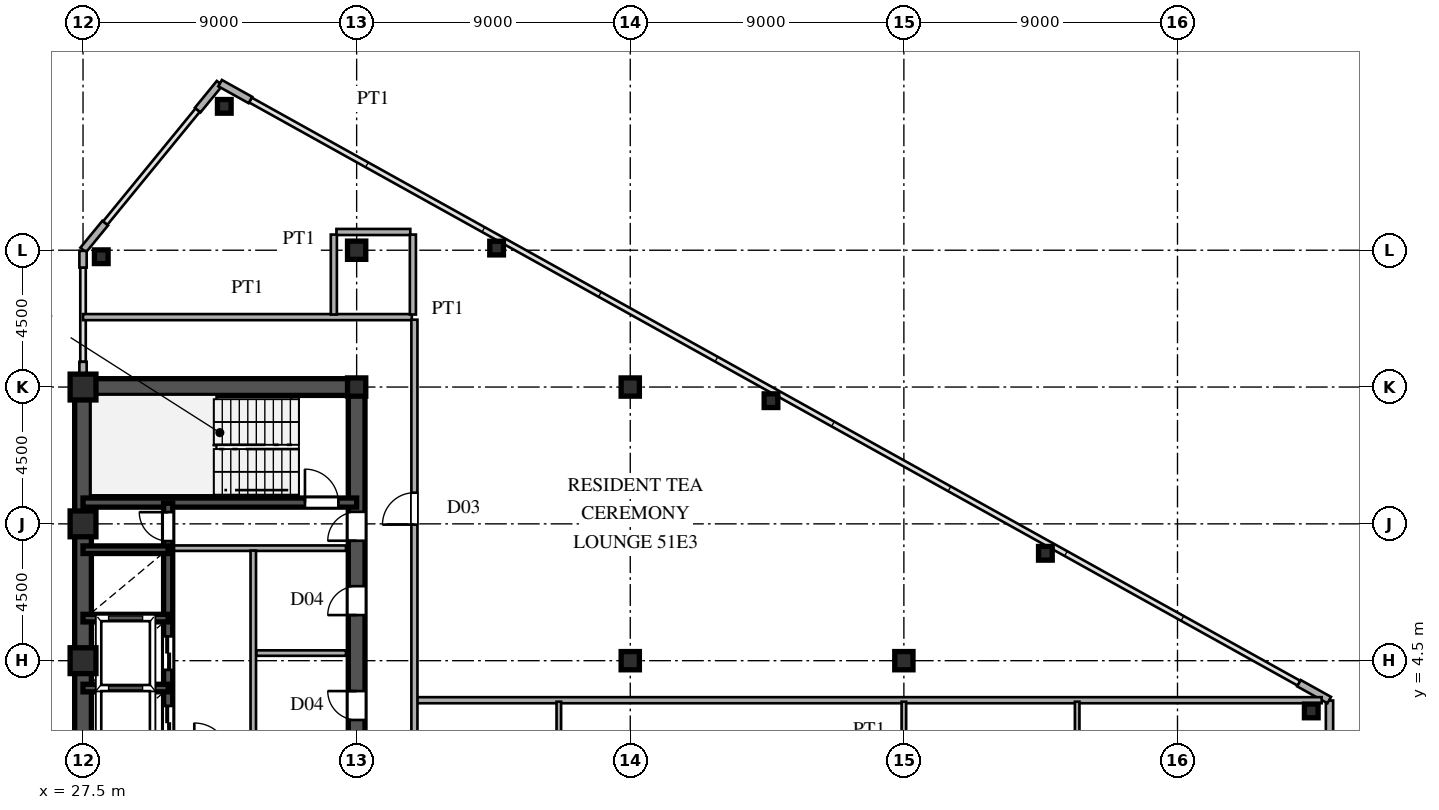
"""IFC4 building model, lengths in metres.
Left out: names, types, materials, properties, quantities, classifications, styles, units other than length and angle.
Written with IfcOpenShell. Run it as: python <this file> out.ifc"""

import sys

from ifc_helpers import new_model, si_unit, direction, frame, frame_2d, origin, origin_2d, place, context, subcontext, project, spatial, rectangle, hollow_rectangle, i_section, extrude, source, transform, mapped, element, fill, save


model = new_model("IFC4")
c1 = context("Model", 3, precision=1e-05, world=origin(), true_north=direction((0.0, 1.0)))
c2 = subcontext(c1, "Body", "Model", "MODEL_VIEW")
j1 = project(units=[si_unit("LENGTHUNIT", "METRE"), si_unit("PLANEANGLEUNIT", "RADIAN")], contexts=[c1])
p1 = place(None, origin())
s1 = spatial("IfcSite", under=j1, at=p1, CompositionType="ELEMENT")
p2 = place(p1, origin())
s2 = spatial("IfcBuilding", under=s1, at=p2, CompositionType="ELEMENT")
p3 = place(p2, frame((0.0, 0.0, 192.3)))
s3 = spatial("IfcBuildingStorey", under=s2, at=p3, CompositionType="ELEMENT", Elevation=192.3)
m1 = source(origin(), c2, "Body", "SweptSolid", [
    extrude(hollow_rectangle(XDim=0.85, YDim=0.85, WallThickness=0.036, at=origin_2d()), origin(), (0.0, 0.0, 1.0), 3.6),
])
for number, where, z_axis, x_axis in (
    (1, (27.5, 4.5, 0.0), (0.0, 0.0, 1.0), (1.0, 0.0, 0.0)),
    (2, (27.5, 9.0, 0.0), (0.0, 0.0, 1.0), (1.0, 0.0, 0.0)),
    (3, (27.5, 13.5, 0.0), (0.0, 0.0, 1.0), (1.0, 0.0, 0.0)),
):
    element("IfcColumn", number, at=place(p3, frame(where, z_axis=z_axis, x_axis=x_axis)), inside=s3, PredefinedType="COLUMN", context=c2, shape_type="MappedRepresentation", body=[
        mapped(m1, transform((0.0, 0.0, 0.0), scale=1.0)),
    ])
m2 = source(origin(), c2, "Body", "SweptSolid", [
    extrude(i_section(OverallWidth=0.6, OverallDepth=0.6, WebThickness=0.025, FlangeThickness=0.04, at=origin_2d()), origin(), (0.0, 0.0, 1.0), 3.6),
])
for number, where, z_axis, x_axis in (
    (4, (36.5, 13.5, 0.0), (0.0, 0.0, 1.0), (1.0, 0.0, 0.0)),
    (5, (36.5, 18.0, 0.0), (0.0, 0.0, 1.0), (1.0, 0.0, 0.0)),
    (6, (45.5, 4.5, 0.0), (0.0, 0.0, 1.0), (1.0, 0.0, 0.0)),
    (7, (45.5, 13.5, 0.0), (0.0, 0.0, 1.0), (1.0, 0.0, 0.0)),
    (8, (54.5, 4.5, 0.0), (0.0, 0.0, 1.0), (1.0, 0.0, 0.0)),
):
    element("IfcColumn", number, at=place(p3, frame(where, z_axis=z_axis, x_axis=x_axis)), inside=s3, PredefinedType="COLUMN", context=c2, shape_type="MappedRepresentation", body=[
        mapped(m2, transform((0.0, 0.0, 0.0), scale=1.0)),
    ])
m3 = source(origin(), c2, "Body", "SweptSolid", [
    extrude(hollow_rectangle(XDim=0.45, YDim=0.45, WallThickness=0.018, at=origin_2d()), origin(), (0.0, 0.0, 1.0), 3.6),
])
for number, where, z_axis, x_axis in (
    (9, (67.9, 2.847, 0.0), (0.0, 0.0, 1.0), (1.0, 0.0, 0.0)),
    (10, (32.147, 22.732, 0.0), (0.0, 0.0, 1.0), (1.0, 0.0, 0.0)),
    (11, (28.1, 17.786, 0.0), (0.0, 0.0, 1.0), (1.0, 0.0, 0.0)),
    (12, (41.104, 18.071, 0.0), (0.0, 0.0, 1.0), (1.0, 0.0, 0.0)),
    (13, (50.129, 13.051, 0.0), (0.0, 0.0, 1.0), (1.0, 0.0, 0.0)),
    (14, (59.155, 8.031, 0.0), (0.0, 0.0, 1.0), (1.0, 0.0, 0.0)),
):
    element("IfcColumn", number, at=place(p3, frame(where, z_axis=z_axis, x_axis=x_axis)), inside=s3, PredefinedType="COLUMN", context=c2, shape_type="MappedRepresentation", body=[
        mapped(m3, transform((0.0, 0.0, 0.0), scale=1.0)),
    ])
for number, where, z_axis, x_axis in (
    (15, (68.5, 2.05, 0.0), (0.0, 0.0, 1.0), (0.0, 1.0, 0.0)),
    (16, (68.491, 3.205, 0.0), (0.0, 0.0, 1.0), (-0.874, 0.486, 0.0)),
    (17, (33.005, 22.941, 0.0), (0.0, 0.0, 1.0), (-0.874, 0.486, 0.0)),
):
    element("IfcWall", number, at=place(p3, frame(where, z_axis=z_axis, x_axis=x_axis)), inside=s3, PredefinedType="SOLIDWALL", context=c2, shape_type="SweptSolid", body=[
        extrude(rectangle(XDim=1.14, YDim=0.24, at=frame_2d((0.57, 0.0))), origin(), (0.0, 0.0, 1.0), 3.38),
    ])
for number, where, z_axis, x_axis in (
    (18, (31.994, 23.492, 0.0), (0.0, 0.0, 1.0), (-0.633, -0.774, 0.0)),
    (19, (28.228, 18.89, 0.0), (0.0, 0.0, 1.0), (-0.633, -0.774, 0.0)),
):
    element("IfcWall", number, at=place(p3, frame(where, z_axis=z_axis, x_axis=x_axis)), inside=s3, PredefinedType="SOLIDWALL", context=c2, shape_type="SweptSolid", body=[
        extrude(rectangle(XDim=1.14, YDim=0.24, at=frame_2d((0.57, 0.0))), origin(), (0.0, 0.0, 1.0), 3.38),
    ])
p4 = place(p3, frame((27.5, 13.78, 0.0), z_axis=(0.0, 0.0, 1.0), x_axis=(0.0, 1.0, 0.0)))
e20 = element("IfcWall", 20, at=p4, inside=s3, PredefinedType="SOLIDWALL", context=c2, shape_type="SweptSolid", body=[
    extrude(rectangle(XDim=0.55, YDim=0.24, at=frame_2d((0.275, 0.0))), origin(), (0.0, 0.0, 1.0), 1.88),
])
p5 = place(p3, frame((27.5, 17.43, 0.0), z_axis=(0.0, 0.0, 1.0), x_axis=(0.0, 1.0, 0.0)))
e21 = element("IfcWall", 21, at=p5, inside=s3, PredefinedType="SOLIDWALL", context=c2, shape_type="SweptSolid", body=[
    extrude(rectangle(XDim=0.55, YDim=0.24, at=frame_2d((0.275, 0.0))), origin(), (0.0, 0.0, 1.0), 3.38),
])
p6 = place(p3, frame((27.5, 1.3, 0.0), z_axis=(0.0, 0.0, 1.0), x_axis=(0.0, 1.0, 0.0)))
e22 = element("IfcWall", 22, at=p6, inside=s3, PredefinedType="SHEAR", context=c2, shape_type="SweptSolid", body=[
    extrude(rectangle(XDim=12.2, YDim=0.55, at=frame_2d((6.1, 0.0))), origin(), (0.0, 0.0, 1.0), 3.38),
])
p7 = place(p3, frame((27.5, 13.5, 0.0), z_axis=(0.0, 0.0, 1.0), x_axis=(1.0, 0.0, 0.0)))
e23 = element("IfcWall", 23, at=p7, inside=s3, PredefinedType="SHEAR", context=c2, shape_type="SweptSolid", body=[
    extrude(rectangle(XDim=9.0, YDim=0.55, at=frame_2d((4.5, 0.0))), origin(), (0.0, 0.0, 1.0), 3.38),
])
p8 = place(p3, frame((36.5, 8.2, 0.0), z_axis=(0.0, 0.0, 1.0), x_axis=(0.0, 1.0, 0.0)))
e24 = element("IfcWall", 24, at=p8, inside=s3, PredefinedType="SHEAR", context=c2, shape_type="SweptSolid", body=[
    extrude(rectangle(XDim=5.45, YDim=0.55, at=frame_2d((2.725, 0.0))), origin(), (0.0, 0.0, 1.0), 3.38),
])
p9 = place(p8, frame((0.245, 0.0, 0.0)))
e25 = element("IfcOpeningElement", 25, at=p9, cuts=e24, PredefinedType="OPENING", context=c2, shape_type="SweptSolid", body=[
    extrude(rectangle(XDim=0.95, YDim=2.15, at=frame_2d((0.475, 1.075))), frame((0.0, 0.285, 0.0), z_axis=(0.0, -1.0, 0.0), x_axis=(1.0, 0.0, 0.0)), (0.0, 0.0, 1.0), 0.57),
])
p10 = place(p3, frame((36.5, 1.3, 0.0), z_axis=(0.0, 0.0, 1.0), x_axis=(0.0, 1.0, 0.0)))
e26 = element("IfcWall", 26, at=p10, inside=s3, PredefinedType="SHEAR", context=c2, shape_type="SweptSolid", body=[
    extrude(rectangle(XDim=3.45, YDim=0.55, at=frame_2d((1.725, 0.0))), origin(), (0.0, 0.0, 1.0), 3.38),
])
p11 = place(p10, frame((1.25, 0.0, 0.0)))
e27 = element("IfcOpeningElement", 27, at=p11, cuts=e26, PredefinedType="OPENING", context=c2, shape_type="SweptSolid", body=[
    extrude(rectangle(XDim=0.95, YDim=2.15, at=frame_2d((0.475, 1.075))), frame((0.0, 0.285, 0.0), z_axis=(0.0, -1.0, 0.0), x_axis=(1.0, 0.0, 0.0)), (0.0, 0.0, 1.0), 0.57),
])
p12 = place(p3, frame((36.5, 4.75, 0.0), z_axis=(0.0, 0.0, 1.0), x_axis=(0.0, 1.0, 0.0)))
e28 = element("IfcWall", 28, at=p12, inside=s3, PredefinedType="SHEAR", context=c2, shape_type="SweptSolid", body=[
    extrude(rectangle(XDim=3.45, YDim=0.55, at=frame_2d((1.725, 0.0))), origin(), (0.0, 0.0, 1.0), 3.38),
])
p13 = place(p12, frame((1.25, 0.0, 0.0)))
e29 = element("IfcOpeningElement", 29, at=p13, cuts=e28, PredefinedType="OPENING", context=c2, shape_type="SweptSolid", body=[
    extrude(rectangle(XDim=0.95, YDim=2.15, at=frame_2d((0.475, 1.075))), frame((0.0, 0.285, 0.0), z_axis=(0.0, -1.0, 0.0), x_axis=(1.0, 0.0, 0.0)), (0.0, 0.0, 1.0), 0.57),
])
p14 = place(p3, frame((27.5, 9.7, 0.0), z_axis=(0.0, 0.0, 1.0), x_axis=(1.0, 0.0, 0.0)))
e30 = element("IfcWall", 30, at=p14, inside=s3, PredefinedType="SHEAR", context=c2, shape_type="SweptSolid", body=[
    extrude(rectangle(XDim=9.0, YDim=0.3, at=frame_2d((4.5, 0.0))), origin(), (0.0, 0.0, 1.0), 3.38),
])
p15 = place(p14, frame((7.3, 0.0, 0.0)))
e31 = element("IfcOpeningElement", 31, at=p15, cuts=e30, PredefinedType="OPENING", context=c2, shape_type="SweptSolid", body=[
    extrude(rectangle(XDim=1.1, YDim=2.2, at=frame_2d((0.55, 1.1))), frame((0.0, 0.16, 0.0), z_axis=(0.0, -1.0, 0.0), x_axis=(1.0, 0.0, 0.0)), (0.0, 0.0, 1.0), 0.32),
])
for number, where, z_axis, x_axis in (
    (32, (27.5, 3.6, 0.0), (0.0, 0.0, 1.0), (1.0, 0.0, 0.0)),
    (33, (27.5, 5.9, 0.0), (0.0, 0.0, 1.0), (1.0, 0.0, 0.0)),
    (34, (27.5, 8.15, 0.0), (0.0, 0.0, 1.0), (1.0, 0.0, 0.0)),
):
    element("IfcWall", number, at=place(p3, frame(where, z_axis=z_axis, x_axis=x_axis)), inside=s3, PredefinedType="SHEAR", context=c2, shape_type="SweptSolid", body=[
        extrude(rectangle(XDim=2.8, YDim=0.25, at=frame_2d((1.4, 0.0))), origin(), (0.0, 0.0, 1.0), 3.38),
    ])
p16 = place(p3, frame((30.3, 1.32, 0.0), z_axis=(0.0, 0.0, 1.0), x_axis=(0.0, 1.0, 0.0)))
e35 = element("IfcWall", 35, at=p16, inside=s3, PredefinedType="SHEAR", context=c2, shape_type="SweptSolid", body=[
    extrude(rectangle(XDim=2.28, YDim=0.3, at=frame_2d((1.14, 0.0))), origin(), (0.0, 0.0, 1.0), 3.38),
])
p17 = place(p16, frame((0.59, 0.0, 0.0)))
e36 = element("IfcOpeningElement", 36, at=p17, cuts=e35, PredefinedType="OPENING", context=c2, shape_type="SweptSolid", body=[
    extrude(rectangle(XDim=1.1, YDim=2.2, at=frame_2d((0.55, 1.1))), frame((0.0, 0.16, 0.0), z_axis=(0.0, -1.0, 0.0), x_axis=(1.0, 0.0, 0.0)), (0.0, 0.0, 1.0), 0.32),
])
p18 = place(p3, frame((30.3, 3.6, 0.0), z_axis=(0.0, 0.0, 1.0), x_axis=(0.0, 1.0, 0.0)))
e37 = element("IfcWall", 37, at=p18, inside=s3, PredefinedType="SHEAR", context=c2, shape_type="SweptSolid", body=[
    extrude(rectangle(XDim=2.3, YDim=0.3, at=frame_2d((1.15, 0.0))), origin(), (0.0, 0.0, 1.0), 3.38),
])
p19 = place(p18, frame((0.6, 0.0, 0.0)))
e38 = element("IfcOpeningElement", 38, at=p19, cuts=e37, PredefinedType="OPENING", context=c2, shape_type="SweptSolid", body=[
    extrude(rectangle(XDim=1.1, YDim=2.2, at=frame_2d((0.55, 1.1))), frame((0.0, 0.16, 0.0), z_axis=(0.0, -1.0, 0.0), x_axis=(1.0, 0.0, 0.0)), (0.0, 0.0, 1.0), 0.32),
])
p20 = place(p3, frame((30.3, 5.9, 0.0), z_axis=(0.0, 0.0, 1.0), x_axis=(0.0, 1.0, 0.0)))
e39 = element("IfcWall", 39, at=p20, inside=s3, PredefinedType="SHEAR", context=c2, shape_type="SweptSolid", body=[
    extrude(rectangle(XDim=2.25, YDim=0.3, at=frame_2d((1.125, 0.0))), origin(), (0.0, 0.0, 1.0), 3.38),
])
p21 = place(p3, frame((30.3, 8.15, 0.0), z_axis=(0.0, 0.0, 1.0), x_axis=(0.0, 1.0, 0.0)))
e40 = element("IfcWall", 40, at=p21, inside=s3, PredefinedType="SHEAR", context=c2, shape_type="SweptSolid", body=[
    extrude(rectangle(XDim=1.53, YDim=0.3, at=frame_2d((0.765, 0.0))), origin(), (0.0, 0.0, 1.0), 3.38),
])
p22 = place(p21, frame((0.285, 0.0, 0.0)))
e41 = element("IfcOpeningElement", 41, at=p22, cuts=e40, PredefinedType="OPENING", context=c2, shape_type="SweptSolid", body=[
    extrude(rectangle(XDim=0.95, YDim=2.15, at=frame_2d((0.475, 1.075))), frame((0.0, 0.16, 0.0), z_axis=(0.0, -1.0, 0.0), x_axis=(1.0, 0.0, 0.0)), (0.0, 0.0, 1.0), 0.32),
])
p23 = place(p3, frame((30.45, 8.2, 0.0), z_axis=(0.0, 0.0, 1.0), x_axis=(1.0, 0.0, 0.0)))
e42 = element("IfcWall", 42, at=p23, inside=s3, PredefinedType="PARTITIONING", context=c2, shape_type="SweptSolid", body=[
    extrude(rectangle(XDim=5.7, YDim=0.18, at=frame_2d((2.85, 0.0))), origin(), (0.0, 0.0, 1.0), 3.38),
])
p24 = place(p3, frame((33.1, 1.38, 0.0), z_axis=(0.0, 0.0, 1.0), x_axis=(0.0, 1.0, 0.0)))
e43 = element("IfcWall", 43, at=p24, inside=s3, PredefinedType="PARTITIONING", context=c2, shape_type="SweptSolid", body=[
    extrude(rectangle(XDim=6.74, YDim=0.18, at=frame_2d((3.37, 0.0))), origin(), (0.0, 0.0, 1.0), 3.38),
])
p25 = place(p3, frame((33.2, 4.75, 0.0), z_axis=(0.0, 0.0, 1.0), x_axis=(1.0, 0.0, 0.0)))
e44 = element("IfcWall", 44, at=p25, inside=s3, PredefinedType="PARTITIONING", context=c2, shape_type="SweptSolid", body=[
    extrude(rectangle(XDim=2.95, YDim=0.18, at=frame_2d((1.475, 0.0))), origin(), (0.0, 0.0, 1.0), 3.38),
])
p26 = place(p3, frame((38.48, 3.2, 0.0), z_axis=(0.0, 0.0, 1.0), x_axis=(1.0, 0.0, 0.0)))
e45 = element("IfcWall", 45, at=p26, inside=s3, PredefinedType="PARTITIONING", context=c2, shape_type="SweptSolid", body=[
    extrude(rectangle(XDim=29.763, YDim=0.2, at=frame_2d((14.881, 0.0))), origin(), (0.0, 0.0, 1.0), 3.38),
])
p27 = place(p3, frame((27.5, 15.8, 0.0), z_axis=(0.0, 0.0, 1.0), x_axis=(1.0, 0.0, 0.0)))
e46 = element("IfcWall", 46, at=p27, inside=s3, PredefinedType="PARTITIONING", context=c2, shape_type="SweptSolid", body=[
    extrude(rectangle(XDim=10.815, YDim=0.2, at=frame_2d((5.407, 0.0))), origin(), (0.0, 0.0, 1.0), 3.38),
])
p28 = place(p3, frame((35.835, 18.6, 0.0), z_axis=(0.0, 0.0, 1.0), x_axis=(1.0, 0.0, 0.0)))
e47 = element("IfcWall", 47, at=p28, inside=s3, PredefinedType="PARTITIONING", context=c2, shape_type="SweptSolid", body=[
    extrude(rectangle(XDim=2.43, YDim=0.2, at=frame_2d((1.215, 0.0))), origin(), (0.0, 0.0, 1.0), 3.38),
])
for number, where, z_axis, x_axis in (
    (48, (35.75, 15.885, 0.0), (0.0, 0.0, 1.0), (0.0, 1.0, 0.0)),
    (49, (38.35, 15.885, 0.0), (0.0, 0.0, 1.0), (0.0, 1.0, 0.0)),
):
    element("IfcWall", number, at=place(p3, frame(where, z_axis=z_axis, x_axis=x_axis)), inside=s3, PredefinedType="PARTITIONING", context=c2, shape_type="SweptSolid", body=[
        extrude(rectangle(XDim=2.63, YDim=0.2, at=frame_2d((1.315, 0.0))), origin(), (0.0, 0.0, 1.0), 3.38),
    ])
p29 = place(p3, frame((38.4, -15.715, 0.0), z_axis=(0.0, 0.0, 1.0), x_axis=(0.0, 1.0, 0.0)))
e50 = element("IfcWall", 50, at=p29, inside=s3, PredefinedType="PARTITIONING", context=c2, shape_type="SweptSolid", body=[
    extrude(rectangle(XDim=31.43, YDim=0.2, at=frame_2d((15.715, 0.0))), origin(), (0.0, 0.0, 1.0), 3.38),
])
p30 = place(p29, frame((2.39, 0.0, 0.0)))
e51 = element("IfcOpeningElement", 51, at=p30, cuts=e50, PredefinedType="OPENING", context=c2, shape_type="SweptSolid", body=[
    extrude(rectangle(XDim=1.05, YDim=2.25, at=frame_2d((0.525, 1.125))), frame((0.0, 0.11, 0.0), z_axis=(0.0, -1.0, 0.0), x_axis=(1.0, 0.0, 0.0)), (0.0, 0.0, 1.0), 0.22),
])
p31 = place(p29, frame((11.695, 0.0, 0.0)))
e52 = element("IfcOpeningElement", 52, at=p31, cuts=e50, PredefinedType="OPENING", context=c2, shape_type="SweptSolid", body=[
    extrude(rectangle(XDim=1.05, YDim=2.25, at=frame_2d((0.525, 1.125))), frame((0.0, 0.11, 0.0), z_axis=(0.0, -1.0, 0.0), x_axis=(1.0, 0.0, 0.0)), (0.0, 0.0, 1.0), 0.22),
])
p32 = place(p29, frame((24.69, 0.0, 0.0)))
e53 = element("IfcOpeningElement", 53, at=p32, cuts=e50, PredefinedType="OPENING", context=c2, shape_type="SweptSolid", body=[
    extrude(rectangle(XDim=1.05, YDim=2.25, at=frame_2d((0.525, 1.125))), frame((0.0, 0.11, 0.0), z_axis=(0.0, -1.0, 0.0), x_axis=(1.0, 0.0, 0.0)), (0.0, 0.0, 1.0), 0.22),
])
p33 = place(p3, frame((43.15, -0.648, 0.0), z_axis=(0.0, 0.0, 1.0), x_axis=(0.0, 1.0, 0.0)))
e54 = element("IfcWall", 54, at=p33, inside=s3, PredefinedType="PARTITIONING", context=c2, shape_type="SweptSolid", body=[
    extrude(rectangle(XDim=3.798, YDim=0.15, at=frame_2d((1.899, 0.0))), origin(), (0.0, 0.0, 1.0), 3.38),
])
p34 = place(p3, frame((54.5, -9.75, 0.0), z_axis=(0.0, 0.0, 1.0), x_axis=(0.0, 1.0, 0.0)))
e55 = element("IfcWall", 55, at=p34, inside=s3, PredefinedType="PARTITIONING", context=c2, shape_type="SweptSolid", body=[
    extrude(rectangle(XDim=12.9, YDim=0.15, at=frame_2d((6.45, 0.0))), origin(), (0.0, 0.0, 1.0), 2.78),
])
p35 = place(p34, frame((5.975, 0.0, 0.0)))
e56 = element("IfcOpeningElement", 56, at=p35, cuts=e55, PredefinedType="OPENING", context=c2, shape_type="SweptSolid", body=[
    extrude(rectangle(XDim=0.95, YDim=2.15, at=frame_2d((0.475, 1.075))), frame((0.0, 0.085, 0.0), z_axis=(0.0, -1.0, 0.0), x_axis=(1.0, 0.0, 0.0)), (0.0, 0.0, 1.0), 0.17),
])
p36 = place(p3, frame((60.2, -5.417, 0.0), z_axis=(0.0, 0.0, 1.0), x_axis=(0.0, 1.0, 0.0)))
e57 = element("IfcWall", 57, at=p36, inside=s3, PredefinedType="PARTITIONING", context=c2, shape_type="SweptSolid", body=[
    extrude(rectangle(XDim=8.567, YDim=0.15, at=frame_2d((4.283, 0.0))), origin(), (0.0, 0.0, 1.0), 3.38),
])
p37 = place(p36, frame((1.642, 0.0, 0.0)))
e58 = element("IfcOpeningElement", 58, at=p37, cuts=e57, PredefinedType="OPENING", context=c2, shape_type="SweptSolid", body=[
    extrude(rectangle(XDim=0.95, YDim=2.15, at=frame_2d((0.475, 1.075))), frame((0.0, 0.085, 0.0), z_axis=(0.0, -1.0, 0.0), x_axis=(1.0, 0.0, 0.0)), (0.0, 0.0, 1.0), 0.17),
])
m4 = source(origin(), c2, "Body", "SweptSolid", [
    extrude(rectangle(XDim=0.95, YDim=2.15, at=frame_2d((0.475, 1.075))), frame((0.0, 0.025, 0.0), z_axis=(0.0, -1.0, 0.0), x_axis=(1.0, 0.0, 0.0)), (0.0, 0.0, 1.0), 0.05),
])
p38 = place(p9, origin())
e59 = element("IfcDoor", 59, at=p38, inside=s3, OperationType="SINGLE_SWING_LEFT", PredefinedType="DOOR", context=c2, shape_type="MappedRepresentation", body=[
    mapped(m4, transform((0.0, 0.0, 0.0), scale=1.0)),
])
fill(e25, e59)
p39 = place(p11, origin())
e60 = element("IfcDoor", 60, at=p39, inside=s3, OperationType="SINGLE_SWING_RIGHT", PredefinedType="DOOR", context=c2, shape_type="MappedRepresentation", body=[
    mapped(m4, transform((0.0, 0.0, 0.0), scale=1.0)),
])
fill(e27, e60)
p40 = place(p13, origin())
e61 = element("IfcDoor", 61, at=p40, inside=s3, OperationType="SINGLE_SWING_LEFT", PredefinedType="DOOR", context=c2, shape_type="MappedRepresentation", body=[
    mapped(m4, transform((0.0, 0.0, 0.0), scale=1.0)),
])
fill(e29, e61)
m5 = source(origin(), c2, "Body", "SweptSolid", [
    extrude(rectangle(XDim=1.1, YDim=2.2, at=frame_2d((0.55, 1.1))), frame((0.0, 0.025, 0.0), z_axis=(0.0, -1.0, 0.0), x_axis=(1.0, 0.0, 0.0)), (0.0, 0.0, 1.0), 0.05),
])
p41 = place(p15, origin())
e62 = element("IfcDoor", 62, at=p41, inside=s3, OperationType="SINGLE_SWING_LEFT", PredefinedType="DOOR", context=c2, shape_type="MappedRepresentation", body=[
    mapped(m5, transform((0.0, 0.0, 0.0), scale=1.0)),
])
fill(e31, e62)
m6 = source(origin(), c2, "Body", "SweptSolid", [
    extrude(rectangle(XDim=1.1, YDim=2.2, at=frame_2d((0.55, 1.1))), frame((0.0, 0.025, 0.0), z_axis=(0.0, -1.0, 0.0), x_axis=(1.0, 0.0, 0.0)), (0.0, 0.0, 1.0), 0.05),
])
p42 = place(p17, origin())
e63 = element("IfcDoor", 63, at=p42, inside=s3, OperationType="DOUBLE_DOOR_SLIDING", PredefinedType="DOOR", context=c2, shape_type="MappedRepresentation", body=[
    mapped(m6, transform((0.0, 0.0, 0.0), scale=1.0)),
])
fill(e36, e63)
p43 = place(p19, origin())
e64 = element("IfcDoor", 64, at=p43, inside=s3, OperationType="DOUBLE_DOOR_SLIDING", PredefinedType="DOOR", context=c2, shape_type="MappedRepresentation", body=[
    mapped(m6, transform((0.0, 0.0, 0.0), scale=1.0)),
])
fill(e38, e64)
p44 = place(p22, origin())
e65 = element("IfcDoor", 65, at=p44, inside=s3, OperationType="SINGLE_SWING_RIGHT", PredefinedType="DOOR", context=c2, shape_type="MappedRepresentation", body=[
    mapped(m4, transform((0.0, 0.0, 0.0), scale=1.0)),
])
fill(e41, e65)
m7 = source(origin(), c2, "Body", "SweptSolid", [
    extrude(rectangle(XDim=1.05, YDim=2.25, at=frame_2d((0.525, 1.125))), frame((0.0, 0.025, 0.0), z_axis=(0.0, -1.0, 0.0), x_axis=(1.0, 0.0, 0.0)), (0.0, 0.0, 1.0), 0.05),
])
p45 = place(p32, origin())
e66 = element("IfcDoor", 66, at=p45, inside=s3, OperationType="SINGLE_SWING_LEFT", PredefinedType="DOOR", context=c2, shape_type="MappedRepresentation", body=[
    mapped(m7, transform((0.0, 0.0, 0.0), scale=1.0)),
])
fill(e53, e66)
save(model, sys.argv[1])
